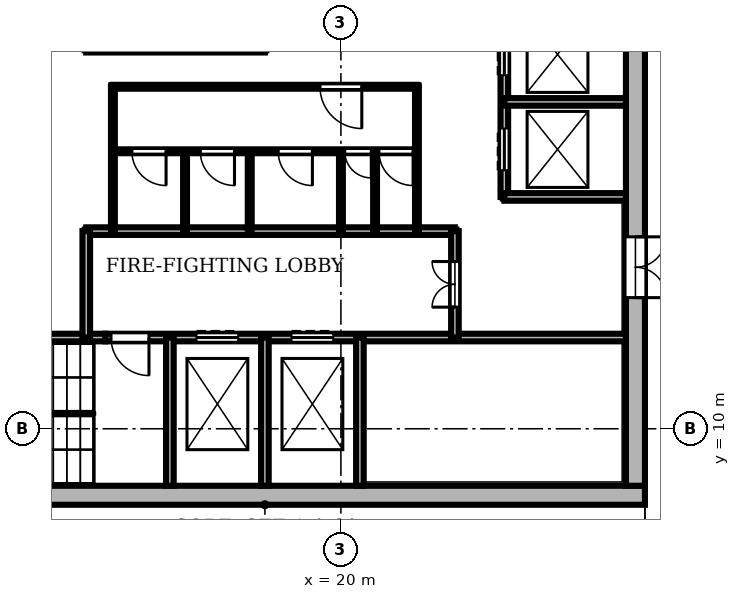
"""IFC4 building model, lengths in metres.
Left out: names, types, materials, properties, quantities, classifications, styles, units other than length and angle.
Written with IfcOpenShell. Run it as: python <this file> out.ifc"""

import sys

from ifc_helpers import new_model, si_unit, direction, frame, frame_2d, origin, place, context, subcontext, project, spatial, rectangle, extrude, element, fill, save


model = new_model("IFC4")
c1 = context("Model", 3, precision=1e-05, world=origin(), true_north=direction((0.0, 1.0)))
c2 = subcontext(c1, "Body", "Model", "MODEL_VIEW")
j1 = project(units=[si_unit("LENGTHUNIT", "METRE"), si_unit("PLANEANGLEUNIT", "RADIAN")], contexts=[c1])
p1 = place(None, origin())
s1 = spatial("IfcSite", under=j1, at=p1, CompositionType="ELEMENT")
p2 = place(p1, origin())
s2 = spatial("IfcBuilding", under=s1, at=p2, CompositionType="ELEMENT")
p3 = place(p2, frame((0.0, 0.0, 246.0)))
s3 = spatial("IfcBuildingStorey", under=s2, at=p3, CompositionType="ELEMENT", Elevation=246.0)
p4 = place(p3, frame((8.0, 8.25, 0.0), z_axis=(0.0, 0.0, 1.0), x_axis=(1.0, 0.0, 0.0)))
e1 = element("IfcWall", 1, at=p4, inside=s3, PredefinedType="SHEAR", context=c2, shape_type="SweptSolid", body=[
    extrude(rectangle(XDim=20.0, YDim=0.5, at=frame_2d((10.0, 0.0))), origin(), (0.0, 0.0, 1.0), 5.4),
])
p5 = place(p3, frame((27.75, 8.5, 0.0), z_axis=(0.0, 0.0, 1.0), x_axis=(0.0, 1.0, 0.0)))
e2 = element("IfcWall", 2, at=p5, inside=s3, PredefinedType="SHEAR", context=c2, shape_type="SweptSolid", body=[
    extrude(rectangle(XDim=19.0, YDim=0.5, at=frame_2d((9.5, 0.0))), origin(), (0.0, 0.0, 1.0), 5.4),
])
p6 = place(p5, frame((4.95, 0.0, 0.0)))
e3 = element("IfcOpeningElement", 3, at=p6, cuts=e2, PredefinedType="OPENING", context=c2, shape_type="SweptSolid", body=[
    extrude(rectangle(XDim=1.6, YDim=2.1, at=frame_2d((0.8, 1.05))), frame((0.0, 0.26, 0.0), z_axis=(0.0, -1.0, 0.0), x_axis=(1.0, 0.0, 0.0)), (0.0, 0.0, 1.0), 0.52),
])
p7 = place(p3, frame((8.5, 12.4, 0.0), z_axis=(0.0, 0.0, 1.0), x_axis=(1.0, 0.0, 0.0)))
e4 = element("IfcWall", 4, at=p7, inside=s3, PredefinedType="SHEAR", context=c2, shape_type="SweptSolid", body=[
    extrude(rectangle(XDim=5.3, YDim=0.2, at=frame_2d((2.65, 0.0))), origin(), (0.0, 0.0, 1.0), 5.08),
])
p8 = place(p3, frame((13.8, 12.4, 0.0), z_axis=(0.0, 0.0, 1.0), x_axis=(1.0, 0.0, 0.0)))
e5 = element("IfcWall", 5, at=p8, inside=s3, PredefinedType="SHEAR", context=c2, shape_type="SweptSolid", body=[
    extrude(rectangle(XDim=13.7, YDim=0.2, at=frame_2d((6.85, 0.0))), origin(), (0.0, 0.0, 1.0), 5.08),
])
p9 = place(p8, frame((2.4, 0.0, 0.0)))
e6 = element("IfcOpeningElement", 6, at=p9, cuts=e5, PredefinedType="OPENING", context=c2, shape_type="SweptSolid", body=[
    extrude(rectangle(XDim=1.1, YDim=2.1, at=frame_2d((0.55, 1.05))), frame((0.0, 0.11, 0.0), z_axis=(0.0, -1.0, 0.0), x_axis=(1.0, 0.0, 0.0)), (0.0, 0.0, 1.0), 0.22),
])
p10 = place(p8, frame((4.9, 0.0, 0.0)))
e7 = element("IfcOpeningElement", 7, at=p10, cuts=e5, PredefinedType="OPENING", context=c2, shape_type="SweptSolid", body=[
    extrude(rectangle(XDim=1.1, YDim=2.1, at=frame_2d((0.55, 1.05))), frame((0.0, 0.11, 0.0), z_axis=(0.0, -1.0, 0.0), x_axis=(1.0, 0.0, 0.0)), (0.0, 0.0, 1.0), 0.22),
])
p11 = place(p8, frame((0.15, 0.0, 0.0)))
e8 = element("IfcOpeningElement", 8, at=p11, cuts=e5, PredefinedType="OPENING", context=c2, shape_type="SweptSolid", body=[
    extrude(rectangle(XDim=1.0, YDim=2.1, at=frame_2d((0.5, 1.05))), frame((0.0, 0.11, 0.0), z_axis=(0.0, -1.0, 0.0), x_axis=(1.0, 0.0, 0.0)), (0.0, 0.0, 1.0), 0.22),
])
p12 = place(p3, frame((13.3, 15.2, 0.0), z_axis=(0.0, 0.0, 1.0), x_axis=(1.0, 0.0, 0.0)))
e9 = element("IfcWall", 9, at=p12, inside=s3, PredefinedType="SHEAR", context=c2, shape_type="SweptSolid", body=[
    extrude(rectangle(XDim=9.7, YDim=0.2, at=frame_2d((4.85, 0.0))), origin(), (0.0, 0.0, 1.0), 5.08),
])
p13 = place(p3, frame((24.3, 16.1, 0.0), z_axis=(0.0, 0.0, 1.0), x_axis=(1.0, 0.0, 0.0)))
e10 = element("IfcWall", 10, at=p13, inside=s3, PredefinedType="SHEAR", context=c2, shape_type="SweptSolid", body=[
    extrude(rectangle(XDim=3.2, YDim=0.2, at=frame_2d((1.6, 0.0))), origin(), (0.0, 0.0, 1.0), 5.08),
])
p14 = place(p3, frame((14.0, 17.3, 0.0), z_axis=(0.0, 0.0, 1.0), x_axis=(1.0, 0.0, 0.0)))
e11 = element("IfcWall", 11, at=p14, inside=s3, PredefinedType="PARTITIONING", context=c2, shape_type="SweptSolid", body=[
    extrude(rectangle(XDim=8.0, YDim=0.1, at=frame_2d((4.0, 0.0))), origin(), (0.0, 0.0, 1.0), 5.08),
])
p15 = place(p14, frame((0.5, 0.0, 0.0)))
e12 = element("IfcOpeningElement", 12, at=p15, cuts=e11, PredefinedType="OPENING", context=c2, shape_type="SweptSolid", body=[
    extrude(rectangle(XDim=0.9, YDim=2.1, at=frame_2d((0.45, 1.05))), frame((0.0, 0.06, 0.0), z_axis=(0.0, -1.0, 0.0), x_axis=(1.0, 0.0, 0.0)), (0.0, 0.0, 1.0), 0.12),
])
p16 = place(p14, frame((2.3, 0.0, 0.0)))
e13 = element("IfcOpeningElement", 13, at=p16, cuts=e11, PredefinedType="OPENING", context=c2, shape_type="SweptSolid", body=[
    extrude(rectangle(XDim=0.9, YDim=2.1, at=frame_2d((0.45, 1.05))), frame((0.0, 0.06, 0.0), z_axis=(0.0, -1.0, 0.0), x_axis=(1.0, 0.0, 0.0)), (0.0, 0.0, 1.0), 0.12),
])
p17 = place(p14, frame((4.35, 0.0, 0.0)))
e14 = element("IfcOpeningElement", 14, at=p17, cuts=e11, PredefinedType="OPENING", context=c2, shape_type="SweptSolid", body=[
    extrude(rectangle(XDim=0.9, YDim=2.1, at=frame_2d((0.45, 1.05))), frame((0.0, 0.06, 0.0), z_axis=(0.0, -1.0, 0.0), x_axis=(1.0, 0.0, 0.0)), (0.0, 0.0, 1.0), 0.12),
])
p18 = place(p14, frame((6.1, 0.0, 0.0)))
e15 = element("IfcOpeningElement", 15, at=p18, cuts=e11, PredefinedType="OPENING", context=c2, shape_type="SweptSolid", body=[
    extrude(rectangle(XDim=0.7, YDim=2.1, at=frame_2d((0.35, 1.05))), frame((0.0, 0.06, 0.0), z_axis=(0.0, -1.0, 0.0), x_axis=(1.0, 0.0, 0.0)), (0.0, 0.0, 1.0), 0.12),
])
p19 = place(p14, frame((7.0, 0.0, 0.0)))
e16 = element("IfcOpeningElement", 16, at=p19, cuts=e11, PredefinedType="OPENING", context=c2, shape_type="SweptSolid", body=[
    extrude(rectangle(XDim=0.9, YDim=2.1, at=frame_2d((0.45, 1.05))), frame((0.0, 0.06, 0.0), z_axis=(0.0, -1.0, 0.0), x_axis=(1.0, 0.0, 0.0)), (0.0, 0.0, 1.0), 0.12),
])
p20 = place(p3, frame((24.3, 18.6, 0.0), z_axis=(0.0, 0.0, 1.0), x_axis=(1.0, 0.0, 0.0)))
e17 = element("IfcWall", 17, at=p20, inside=s3, PredefinedType="SHEAR", context=c2, shape_type="SweptSolid", body=[
    extrude(rectangle(XDim=3.2, YDim=0.2, at=frame_2d((1.6, 0.0))), origin(), (0.0, 0.0, 1.0), 5.08),
])
p21 = place(p3, frame((14.0, 19.0, 0.0), z_axis=(0.0, 0.0, 1.0), x_axis=(1.0, 0.0, 0.0)))
e18 = element("IfcWall", 18, at=p21, inside=s3, PredefinedType="PARTITIONING", context=c2, shape_type="SweptSolid", body=[
    extrude(rectangle(XDim=8.0, YDim=0.1, at=frame_2d((4.0, 0.0))), origin(), (0.0, 0.0, 1.0), 5.08),
])
p22 = place(p21, frame((5.45, 0.0, 0.0)))
e19 = element("IfcOpeningElement", 19, at=p22, cuts=e18, PredefinedType="OPENING", context=c2, shape_type="SweptSolid", body=[
    extrude(rectangle(XDim=1.1, YDim=2.1, at=frame_2d((0.55, 1.05))), frame((0.0, 0.06, 0.0), z_axis=(0.0, -1.0, 0.0), x_axis=(1.0, 0.0, 0.0)), (0.0, 0.0, 1.0), 0.12),
])
p23 = place(p3, frame((13.3, 12.4, 0.0), z_axis=(0.0, 0.0, 1.0), x_axis=(0.0, 1.0, 0.0)))
e20 = element("IfcWall", 20, at=p23, inside=s3, PredefinedType="SHEAR", context=c2, shape_type="SweptSolid", body=[
    extrude(rectangle(XDim=2.8, YDim=0.2, at=frame_2d((1.4, 0.0))), origin(), (0.0, 0.0, 1.0), 5.08),
])
p24 = place(p3, frame((14.0, 15.2, 0.0), z_axis=(0.0, 0.0, 1.0), x_axis=(0.0, 1.0, 0.0)))
e21 = element("IfcWall", 21, at=p24, inside=s3, PredefinedType="PARTITIONING", context=c2, shape_type="SweptSolid", body=[
    extrude(rectangle(XDim=3.8, YDim=0.1, at=frame_2d((1.9, 0.0))), origin(), (0.0, 0.0, 1.0), 5.08),
])
p25 = place(p3, frame((15.5, 8.5, 0.0), z_axis=(0.0, 0.0, 1.0), x_axis=(0.0, 1.0, 0.0)))
e22 = element("IfcWall", 22, at=p25, inside=s3, PredefinedType="SHEAR", context=c2, shape_type="SweptSolid", body=[
    extrude(rectangle(XDim=3.9, YDim=0.2, at=frame_2d((1.95, 0.0))), origin(), (0.0, 0.0, 1.0), 5.08),
])
for number, where, z_axis, x_axis in (
    (23, (15.9, 15.2, 0.0), (0.0, 0.0, 1.0), (0.0, 1.0, 0.0)),
    (24, (17.6, 15.2, 0.0), (0.0, 0.0, 1.0), (0.0, 1.0, 0.0)),
):
    element("IfcWall", number, at=place(p3, frame(where, z_axis=z_axis, x_axis=x_axis)), inside=s3, PredefinedType="PARTITIONING", context=c2, shape_type="SweptSolid", body=[
        extrude(rectangle(XDim=2.1, YDim=0.1, at=frame_2d((1.05, 0.0))), origin(), (0.0, 0.0, 1.0), 5.08),
    ])
p26 = place(p3, frame((18.0, 8.5, 0.0), z_axis=(0.0, 0.0, 1.0), x_axis=(0.0, 1.0, 0.0)))
e25 = element("IfcWall", 25, at=p26, inside=s3, PredefinedType="SHEAR", context=c2, shape_type="SweptSolid", body=[
    extrude(rectangle(XDim=3.9, YDim=0.2, at=frame_2d((1.95, 0.0))), origin(), (0.0, 0.0, 1.0), 5.08),
])
p27 = place(p3, frame((20.0, 15.2, 0.0), z_axis=(0.0, 0.0, 1.0), x_axis=(0.0, 1.0, 0.0)))
e26 = element("IfcWall", 26, at=p27, inside=s3, PredefinedType="PARTITIONING", context=c2, shape_type="SweptSolid", body=[
    extrude(rectangle(XDim=2.1, YDim=0.1, at=frame_2d((1.05, 0.0))), origin(), (0.0, 0.0, 1.0), 5.08),
])
p28 = place(p3, frame((20.5, 8.5, 0.0), z_axis=(0.0, 0.0, 1.0), x_axis=(0.0, 1.0, 0.0)))
e27 = element("IfcWall", 27, at=p28, inside=s3, PredefinedType="SHEAR", context=c2, shape_type="SweptSolid", body=[
    extrude(rectangle(XDim=3.9, YDim=0.2, at=frame_2d((1.95, 0.0))), origin(), (0.0, 0.0, 1.0), 5.08),
])
p29 = place(p3, frame((20.9, 15.2, 0.0), z_axis=(0.0, 0.0, 1.0), x_axis=(0.0, 1.0, 0.0)))
e28 = element("IfcWall", 28, at=p29, inside=s3, PredefinedType="PARTITIONING", context=c2, shape_type="SweptSolid", body=[
    extrude(rectangle(XDim=2.1, YDim=0.1, at=frame_2d((1.05, 0.0))), origin(), (0.0, 0.0, 1.0), 5.08),
])
p30 = place(p3, frame((22.0, 15.2, 0.0), z_axis=(0.0, 0.0, 1.0), x_axis=(0.0, 1.0, 0.0)))
e29 = element("IfcWall", 29, at=p30, inside=s3, PredefinedType="PARTITIONING", context=c2, shape_type="SweptSolid", body=[
    extrude(rectangle(XDim=3.8, YDim=0.1, at=frame_2d((1.9, 0.0))), origin(), (0.0, 0.0, 1.0), 5.08),
])
p31 = place(p3, frame((23.0, 12.4, 0.0), z_axis=(0.0, 0.0, 1.0), x_axis=(0.0, 1.0, 0.0)))
e30 = element("IfcWall", 30, at=p31, inside=s3, PredefinedType="SHEAR", context=c2, shape_type="SweptSolid", body=[
    extrude(rectangle(XDim=2.8, YDim=0.2, at=frame_2d((1.4, 0.0))), origin(), (0.0, 0.0, 1.0), 5.08),
])
p32 = place(p31, frame((0.8, 0.0, 0.0)))
e31 = element("IfcOpeningElement", 31, at=p32, cuts=e30, PredefinedType="OPENING", context=c2, shape_type="SweptSolid", body=[
    extrude(rectangle(XDim=1.2, YDim=2.1, at=frame_2d((0.6, 1.05))), frame((0.0, 0.11, 0.0), z_axis=(0.0, -1.0, 0.0), x_axis=(1.0, 0.0, 0.0)), (0.0, 0.0, 1.0), 0.22),
])
p33 = place(p3, frame((24.3, 16.1, 0.0), z_axis=(0.0, 0.0, 1.0), x_axis=(0.0, 1.0, 0.0)))
e32 = element("IfcWall", 32, at=p33, inside=s3, PredefinedType="SHEAR", context=c2, shape_type="SweptSolid", body=[
    extrude(rectangle(XDim=7.5, YDim=0.2, at=frame_2d((3.75, 0.0))), origin(), (0.0, 0.0, 1.0), 5.08),
])
p34 = place(p33, frame((0.7, 0.0, 0.0)))
e33 = element("IfcOpeningElement", 33, at=p34, cuts=e32, PredefinedType="OPENING", context=c2, shape_type="SweptSolid", body=[
    extrude(rectangle(XDim=1.1, YDim=2.1, at=frame_2d((0.55, 1.05))), frame((0.0, 0.11, 0.0), z_axis=(0.0, -1.0, 0.0), x_axis=(1.0, 0.0, 0.0)), (0.0, 0.0, 1.0), 0.22),
])
p35 = place(p33, frame((3.2, 0.0, 0.0)))
e34 = element("IfcOpeningElement", 34, at=p35, cuts=e32, PredefinedType="OPENING", context=c2, shape_type="SweptSolid", body=[
    extrude(rectangle(XDim=1.1, YDim=2.1, at=frame_2d((0.55, 1.05))), frame((0.0, 0.11, 0.0), z_axis=(0.0, -1.0, 0.0), x_axis=(1.0, 0.0, 0.0)), (0.0, 0.0, 1.0), 0.22),
])
p36 = place(p33, frame((5.7, 0.0, 0.0)))
e35 = element("IfcOpeningElement", 35, at=p36, cuts=e32, PredefinedType="OPENING", context=c2, shape_type="SweptSolid", body=[
    extrude(rectangle(XDim=1.1, YDim=2.1, at=frame_2d((0.55, 1.05))), frame((0.0, 0.11, 0.0), z_axis=(0.0, -1.0, 0.0), x_axis=(1.0, 0.0, 0.0)), (0.0, 0.0, 1.0), 0.22),
])
p37 = place(p34, origin())
e36 = element("IfcDoor", 36, at=p37, inside=s3, OperationType="DOUBLE_DOOR_SLIDING", PredefinedType="DOOR", context=c2, shape_type="SweptSolid", body=[
    extrude(rectangle(XDim=1.1, YDim=2.1, at=frame_2d((0.55, 1.05))), frame((0.0, 0.025, 0.0), z_axis=(0.0, -1.0, 0.0), x_axis=(1.0, 0.0, 0.0)), (0.0, 0.0, 1.0), 0.05),
])
fill(e33, e36)
p38 = place(p35, origin())
e37 = element("IfcDoor", 37, at=p38, inside=s3, OperationType="DOUBLE_DOOR_SLIDING", PredefinedType="DOOR", context=c2, shape_type="SweptSolid", body=[
    extrude(rectangle(XDim=1.1, YDim=2.1, at=frame_2d((0.55, 1.05))), frame((0.0, 0.025, 0.0), z_axis=(0.0, -1.0, 0.0), x_axis=(1.0, 0.0, 0.0)), (0.0, 0.0, 1.0), 0.05),
])
fill(e34, e37)
p39 = place(p9, origin())
e38 = element("IfcDoor", 38, at=p39, inside=s3, OperationType="DOUBLE_DOOR_SLIDING", PredefinedType="DOOR", context=c2, shape_type="SweptSolid", body=[
    extrude(rectangle(XDim=1.1, YDim=2.1, at=frame_2d((0.55, 1.05))), frame((0.0, 0.025, 0.0), z_axis=(0.0, -1.0, 0.0), x_axis=(1.0, 0.0, 0.0)), (0.0, 0.0, 1.0), 0.05),
])
fill(e6, e38)
p40 = place(p10, origin())
e39 = element("IfcDoor", 39, at=p40, inside=s3, OperationType="DOUBLE_DOOR_SLIDING", PredefinedType="DOOR", context=c2, shape_type="SweptSolid", body=[
    extrude(rectangle(XDim=1.1, YDim=2.1, at=frame_2d((0.55, 1.05))), frame((0.0, 0.025, 0.0), z_axis=(0.0, -1.0, 0.0), x_axis=(1.0, 0.0, 0.0)), (0.0, 0.0, 1.0), 0.05),
])
fill(e7, e39)
p41 = place(p11, frame((1.0, 0.0, 0.0), z_axis=(0.0, 0.0, 1.0), x_axis=(-1.0, 0.0, 0.0)))
e40 = element("IfcDoor", 40, at=p41, inside=s3, OperationType="SINGLE_SWING_LEFT", PredefinedType="DOOR", context=c2, shape_type="SweptSolid", body=[
    extrude(rectangle(XDim=1.0, YDim=2.1, at=frame_2d((0.5, 1.05))), frame((0.0, 0.025, 0.0), z_axis=(0.0, -1.0, 0.0), x_axis=(1.0, 0.0, 0.0)), (0.0, 0.0, 1.0), 0.05),
])
fill(e8, e40)
p42 = place(p32, origin())
e41 = element("IfcDoor", 41, at=p42, inside=s3, OperationType="DOUBLE_DOOR_SINGLE_SWING", PredefinedType="DOOR", context=c2, shape_type="SweptSolid", body=[
    extrude(rectangle(XDim=1.2, YDim=2.1, at=frame_2d((0.6, 1.05))), frame((0.0, 0.025, 0.0), z_axis=(0.0, -1.0, 0.0), x_axis=(1.0, 0.0, 0.0)), (0.0, 0.0, 1.0), 0.05),
])
fill(e31, e41)
p43 = place(p22, frame((1.1, 0.0, 0.0), z_axis=(0.0, 0.0, 1.0), x_axis=(-1.0, 0.0, 0.0)))
e42 = element("IfcDoor", 42, at=p43, inside=s3, OperationType="SINGLE_SWING_LEFT", PredefinedType="DOOR", context=c2, shape_type="SweptSolid", body=[
    extrude(rectangle(XDim=1.1, YDim=2.1, at=frame_2d((0.55, 1.05))), frame((0.0, 0.025, 0.0), z_axis=(0.0, -1.0, 0.0), x_axis=(1.0, 0.0, 0.0)), (0.0, 0.0, 1.0), 0.05),
])
fill(e19, e42)
p44 = place(p15, frame((0.9, 0.0, 0.0), z_axis=(0.0, 0.0, 1.0), x_axis=(-1.0, 0.0, 0.0)))
e43 = element("IfcDoor", 43, at=p44, inside=s3, OperationType="SINGLE_SWING_LEFT", PredefinedType="DOOR", context=c2, shape_type="SweptSolid", body=[
    extrude(rectangle(XDim=0.9, YDim=2.1, at=frame_2d((0.45, 1.05))), frame((0.0, 0.025, 0.0), z_axis=(0.0, -1.0, 0.0), x_axis=(1.0, 0.0, 0.0)), (0.0, 0.0, 1.0), 0.05),
])
fill(e12, e43)
p45 = place(p16, frame((0.9, 0.0, 0.0), z_axis=(0.0, 0.0, 1.0), x_axis=(-1.0, 0.0, 0.0)))
e44 = element("IfcDoor", 44, at=p45, inside=s3, OperationType="SINGLE_SWING_LEFT", PredefinedType="DOOR", context=c2, shape_type="SweptSolid", body=[
    extrude(rectangle(XDim=0.9, YDim=2.1, at=frame_2d((0.45, 1.05))), frame((0.0, 0.025, 0.0), z_axis=(0.0, -1.0, 0.0), x_axis=(1.0, 0.0, 0.0)), (0.0, 0.0, 1.0), 0.05),
])
fill(e13, e44)
p46 = place(p17, frame((0.9, 0.0, 0.0), z_axis=(0.0, 0.0, 1.0), x_axis=(-1.0, 0.0, 0.0)))
e45 = element("IfcDoor", 45, at=p46, inside=s3, OperationType="SINGLE_SWING_LEFT", PredefinedType="DOOR", context=c2, shape_type="SweptSolid", body=[
    extrude(rectangle(XDim=0.9, YDim=2.1, at=frame_2d((0.45, 1.05))), frame((0.0, 0.025, 0.0), z_axis=(0.0, -1.0, 0.0), x_axis=(1.0, 0.0, 0.0)), (0.0, 0.0, 1.0), 0.05),
])
fill(e14, e45)
p47 = place(p18, frame((0.7, 0.0, 0.0), z_axis=(0.0, 0.0, 1.0), x_axis=(-1.0, 0.0, 0.0)))
e46 = element("IfcDoor", 46, at=p47, inside=s3, OperationType="SINGLE_SWING_LEFT", PredefinedType="DOOR", context=c2, shape_type="SweptSolid", body=[
    extrude(rectangle(XDim=0.7, YDim=2.1, at=frame_2d((0.35, 1.05))), frame((0.0, 0.025, 0.0), z_axis=(0.0, -1.0, 0.0), x_axis=(1.0, 0.0, 0.0)), (0.0, 0.0, 1.0), 0.05),
])
fill(e15, e46)
p48 = place(p19, frame((0.9, 0.0, 0.0), z_axis=(0.0, 0.0, 1.0), x_axis=(-1.0, 0.0, 0.0)))
e47 = element("IfcDoor", 47, at=p48, inside=s3, OperationType="SINGLE_SWING_LEFT", PredefinedType="DOOR", context=c2, shape_type="SweptSolid", body=[
    extrude(rectangle(XDim=0.9, YDim=2.1, at=frame_2d((0.45, 1.05))), frame((0.0, 0.025, 0.0), z_axis=(0.0, -1.0, 0.0), x_axis=(1.0, 0.0, 0.0)), (0.0, 0.0, 1.0), 0.05),
])
fill(e16, e47)
p49 = place(p6, frame((1.6, 0.0, 0.0), z_axis=(0.0, 0.0, 1.0), x_axis=(-1.0, 0.0, 0.0)))
e48 = element("IfcDoor", 48, at=p49, inside=s3, OperationType="DOUBLE_DOOR_SINGLE_SWING", PredefinedType="DOOR", context=c2, shape_type="SweptSolid", body=[
    extrude(rectangle(XDim=1.6, YDim=2.1, at=frame_2d((0.8, 1.05))), frame((0.0, 0.025, 0.0), z_axis=(0.0, -1.0, 0.0), x_axis=(1.0, 0.0, 0.0)), (0.0, 0.0, 1.0), 0.05),
])
fill(e3, e48)
save(model, sys.argv[1])
